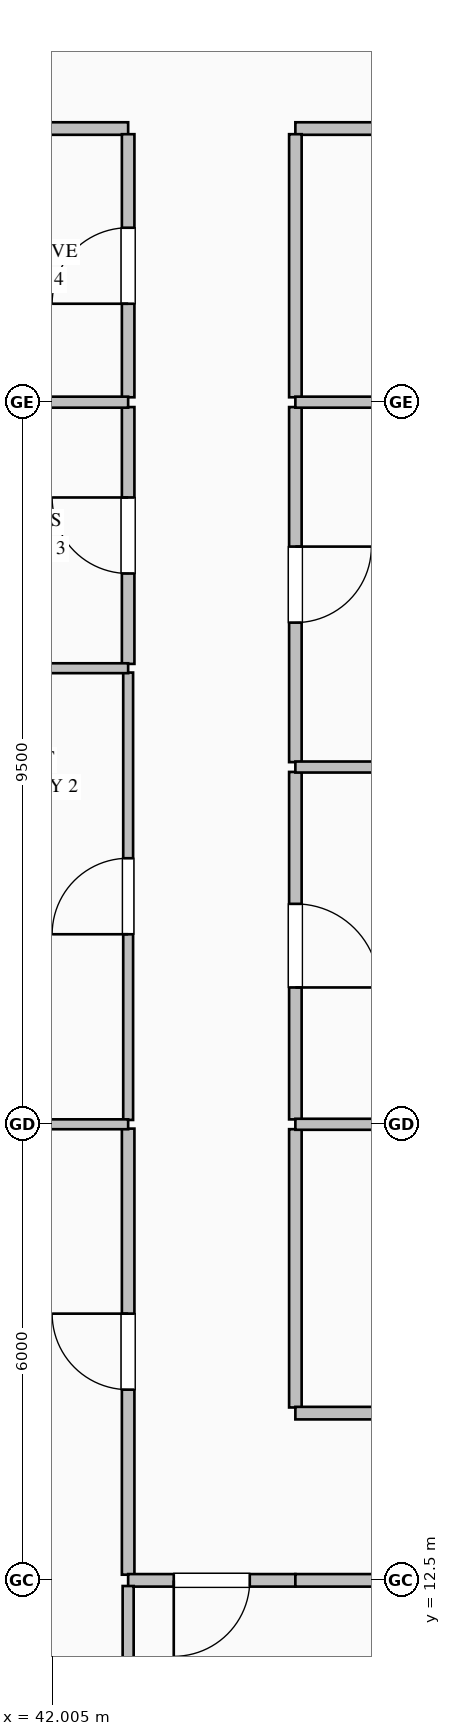
"""IFC4 building model, lengths in metres.
Left out: names, types, materials, properties, quantities, classifications, styles, units other than length and angle.
Written with IfcOpenShell. Run it as: python <this file> out.ifc"""

import sys

from ifc_helpers import new_model, si_unit, direction, frame, frame_2d, origin, place, context, subcontext, project, spatial, rectangle, extrude, element, fill, save


model = new_model("IFC4")
c1 = context("Model", 3, precision=1e-05, world=origin(), true_north=direction((0.0, 1.0)))
c2 = subcontext(c1, "Body", "Model", "MODEL_VIEW")
j1 = project(units=[si_unit("LENGTHUNIT", "METRE"), si_unit("PLANEANGLEUNIT", "RADIAN")], contexts=[c1])
p1 = place(None, origin())
s1 = spatial("IfcSite", under=j1, at=p1, CompositionType="ELEMENT")
p2 = place(p1, origin())
s2 = spatial("IfcBuilding", under=s1, at=p2, CompositionType="ELEMENT")
p3 = place(p2, frame((0.0, 0.0, 36.2)))
s3 = spatial("IfcBuildingStorey", under=s2, at=p3, CompositionType="ELEMENT", Elevation=36.2)
p4 = place(p3, frame((56.5, 31.6, 0.0), z_axis=(0.0, 0.0, 1.0), x_axis=(-1.0, 0.0, 0.0)))
e1 = element("IfcWall", 1, at=p4, inside=s3, PredefinedType="PARTITIONING", context=c2, shape_type="SweptSolid", body=[
    extrude(rectangle(XDim=11.3, YDim=0.165, at=frame_2d((5.65, 0.0))), origin(), (0.0, 0.0, 1.0), 3.75),
])
p5 = place(p4, frame((5.15, 0.0, 0.0)))
e2 = element("IfcOpeningElement", 2, at=p5, cuts=e1, PredefinedType="OPENING", context=c2, shape_type="SweptSolid", body=[
    extrude(rectangle(XDim=1.0, YDim=2.15, at=frame_2d((0.5, 1.075))), frame((0.0, 0.093, 0.0), z_axis=(0.0, -1.0, 0.0), x_axis=(1.0, 0.0, 0.0)), (0.0, 0.0, 1.0), 0.185),
])
p6 = place(p3, frame((43.0, 31.6, 0.0), z_axis=(0.0, 0.0, 1.0), x_axis=(-1.0, 0.0, 0.0)))
e3 = element("IfcWall", 3, at=p6, inside=s3, PredefinedType="PARTITIONING", context=c2, shape_type="SweptSolid", body=[
    extrude(rectangle(XDim=2.5, YDim=0.165, at=frame_2d((1.25, 0.0))), origin(), (0.0, 0.0, 1.0), 3.75),
])
p7 = place(p3, frame((45.2, 18.436, 0.0), z_axis=(0.0, 0.0, 1.0), x_axis=(0.0, -1.0, 0.0)))
e4 = element("IfcWall", 4, at=p7, inside=s3, PredefinedType="PARTITIONING", context=c2, shape_type="SweptSolid", body=[
    extrude(rectangle(XDim=3.661, YDim=0.165, at=frame_2d((1.831, 0.0))), origin(), (0.0, 0.0, 1.0), 3.75),
])
p8 = place(p3, frame((45.2, 23.135, 0.0), z_axis=(0.0, 0.0, 1.0), x_axis=(0.0, -1.0, 0.0)))
e5 = element("IfcWall", 5, at=p8, inside=s3, PredefinedType="PARTITIONING", context=c2, shape_type="SweptSolid", body=[
    extrude(rectangle(XDim=4.571, YDim=0.165, at=frame_2d((2.286, 0.0))), origin(), (0.0, 0.0, 1.0), 3.75),
])
p9 = place(p8, frame((1.736, 0.0, 0.0)))
e6 = element("IfcOpeningElement", 6, at=p9, cuts=e5, PredefinedType="OPENING", context=c2, shape_type="SweptSolid", body=[
    extrude(rectangle(XDim=1.1, YDim=2.2, at=frame_2d((0.55, 1.1))), frame((0.0, 0.093, 0.0), z_axis=(0.0, -1.0, 0.0), x_axis=(1.0, 0.0, 0.0)), (0.0, 0.0, 1.0), 0.185),
])
p10 = place(p3, frame((45.2, 27.936, 0.0), z_axis=(0.0, 0.0, 1.0), x_axis=(0.0, -1.0, 0.0)))
e7 = element("IfcWall", 7, at=p10, inside=s3, PredefinedType="PARTITIONING", context=c2, shape_type="SweptSolid", body=[
    extrude(rectangle(XDim=4.671, YDim=0.165, at=frame_2d((2.335, 0.0))), origin(), (0.0, 0.0, 1.0), 3.75),
])
p11 = place(p10, frame((1.835, 0.0, 0.0)))
e8 = element("IfcOpeningElement", 8, at=p11, cuts=e7, PredefinedType="OPENING", context=c2, shape_type="SweptSolid", body=[
    extrude(rectangle(XDim=1.0, YDim=2.15, at=frame_2d((0.5, 1.075))), frame((0.0, 0.093, 0.0), z_axis=(0.0, -1.0, 0.0), x_axis=(1.0, 0.0, 0.0)), (0.0, 0.0, 1.0), 0.185),
])
p12 = place(p3, frame((45.2, 31.525, 0.0), z_axis=(0.0, 0.0, 1.0), x_axis=(0.0, -1.0, 0.0)))
e9 = element("IfcWall", 9, at=p12, inside=s3, PredefinedType="PARTITIONING", context=c2, shape_type="SweptSolid", body=[
    extrude(rectangle(XDim=3.461, YDim=0.165, at=frame_2d((1.73, 0.0))), origin(), (0.0, 0.0, 1.0), 3.75),
])
p13 = place(p3, frame((43.0, 12.574, 0.0), z_axis=(0.0, 0.0, 1.0), x_axis=(0.0, 1.0, 0.0)))
e10 = element("IfcWall", 10, at=p13, inside=s3, PredefinedType="PARTITIONING", context=c2, shape_type="SweptSolid", body=[
    extrude(rectangle(XDim=5.869, YDim=0.165, at=frame_2d((2.934, 0.0))), origin(), (0.0, 0.0, 1.0), 3.75),
])
p14 = place(p13, frame((2.434, 0.0, 0.0)))
e11 = element("IfcOpeningElement", 11, at=p14, cuts=e10, PredefinedType="OPENING", context=c2, shape_type="SweptSolid", body=[
    extrude(rectangle(XDim=1.0, YDim=2.15, at=frame_2d((0.5, 1.075))), frame((0.0, 0.093, 0.0), z_axis=(0.0, -1.0, 0.0), x_axis=(1.0, 0.0, 0.0)), (0.0, 0.0, 1.0), 0.185),
])
p15 = place(p3, frame((43.0, 18.557, 0.0), z_axis=(0.0, 0.0, 1.0), x_axis=(0.0, 1.0, 0.0)))
e12 = element("IfcWall", 12, at=p15, inside=s3, PredefinedType="PARTITIONING", context=c2, shape_type="SweptSolid", body=[
    extrude(rectangle(XDim=5.886, YDim=0.13, at=frame_2d((2.943, 0.0))), origin(), (0.0, 0.0, 1.0), 3.75),
])
p16 = place(p15, frame((2.443, 0.0, 0.0)))
e13 = element("IfcOpeningElement", 13, at=p16, cuts=e12, PredefinedType="OPENING", context=c2, shape_type="SweptSolid", body=[
    extrude(rectangle(XDim=1.0, YDim=2.15, at=frame_2d((0.5, 1.075))), frame((0.0, 0.075, 0.0), z_axis=(0.0, -1.0, 0.0), x_axis=(1.0, 0.0, 0.0)), (0.0, 0.0, 1.0), 0.15),
])
p17 = place(p3, frame((43.0, 24.557, 0.0), z_axis=(0.0, 0.0, 1.0), x_axis=(0.0, 1.0, 0.0)))
e14 = element("IfcWall", 14, at=p17, inside=s3, PredefinedType="PARTITIONING", context=c2, shape_type="SweptSolid", body=[
    extrude(rectangle(XDim=3.379, YDim=0.165, at=frame_2d((1.689, 0.0))), origin(), (0.0, 0.0, 1.0), 3.75),
])
p18 = place(p17, frame((1.189, 0.0, 0.0)))
e15 = element("IfcOpeningElement", 15, at=p18, cuts=e14, PredefinedType="OPENING", context=c2, shape_type="SweptSolid", body=[
    extrude(rectangle(XDim=1.0, YDim=2.15, at=frame_2d((0.5, 1.075))), frame((0.0, 0.093, 0.0), z_axis=(0.0, -1.0, 0.0), x_axis=(1.0, 0.0, 0.0)), (0.0, 0.0, 1.0), 0.185),
])
p19 = place(p3, frame((43.0, 28.064, 0.0), z_axis=(0.0, 0.0, 1.0), x_axis=(0.0, 1.0, 0.0)))
e16 = element("IfcWall", 16, at=p19, inside=s3, PredefinedType="PARTITIONING", context=c2, shape_type="SweptSolid", body=[
    extrude(rectangle(XDim=3.461, YDim=0.165, at=frame_2d((1.73, 0.0))), origin(), (0.0, 0.0, 1.0), 3.75),
])
p20 = place(p19, frame((1.23, 0.0, 0.0)))
e17 = element("IfcOpeningElement", 17, at=p20, cuts=e16, PredefinedType="OPENING", context=c2, shape_type="SweptSolid", body=[
    extrude(rectangle(XDim=1.0, YDim=2.15, at=frame_2d((0.5, 1.075))), frame((0.0, 0.093, 0.0), z_axis=(0.0, -1.0, 0.0), x_axis=(1.0, 0.0, 0.0)), (0.0, 0.0, 1.0), 0.185),
])
p21 = place(p3, frame((45.2, 12.5, 0.0), z_axis=(0.0, 0.0, 1.0), x_axis=(-1.0, 0.0, 0.0)))
e18 = element("IfcWall", 18, at=p21, inside=s3, PredefinedType="PARTITIONING", context=c2, shape_type="SweptSolid", body=[
    extrude(rectangle(XDim=2.2, YDim=0.165, at=frame_2d((1.1, 0.0))), origin(), (0.0, 0.0, 1.0), 3.042),
])
p22 = place(p21, frame((0.6, 0.0, 0.0)))
e19 = element("IfcOpeningElement", 19, at=p22, cuts=e18, PredefinedType="OPENING", context=c2, shape_type="SweptSolid", body=[
    extrude(rectangle(XDim=1.0, YDim=2.15, at=frame_2d((0.5, 1.075))), frame((0.0, 0.093, 0.0), z_axis=(0.0, -1.0, 0.0), x_axis=(1.0, 0.0, 0.0)), (0.0, 0.0, 1.0), 0.185),
])
p23 = place(p3, frame((45.2, 14.7, 0.0), z_axis=(0.0, 0.0, 1.0), x_axis=(1.0, 0.0, 0.0)))
e20 = element("IfcWall", 20, at=p23, inside=s3, PredefinedType="PARTITIONING", context=c2, shape_type="SweptSolid", body=[
    extrude(rectangle(XDim=16.3, YDim=0.165, at=frame_2d((8.15, 0.0))), origin(), (0.0, 0.0, 1.0), 3.75),
])
p24 = place(p23, frame((7.65, 0.0, 0.0)))
e21 = element("IfcOpeningElement", 21, at=p24, cuts=e20, PredefinedType="OPENING", context=c2, shape_type="SweptSolid", body=[
    extrude(rectangle(XDim=1.0, YDim=2.15, at=frame_2d((0.5, 1.075))), frame((0.0, 0.093, 0.0), z_axis=(0.0, -1.0, 0.0), x_axis=(1.0, 0.0, 0.0)), (0.0, 0.0, 1.0), 0.185),
])
p25 = place(p3, frame((46.5, 12.5, 0.0), z_axis=(0.0, 0.0, 1.0), x_axis=(-1.0, 0.0, 0.0)))
e22 = element("IfcWall", 22, at=p25, inside=s3, PredefinedType="PARTITIONING", context=c2, shape_type="SweptSolid", body=[
    extrude(rectangle(XDim=1.3, YDim=0.165, at=frame_2d((0.65, 0.0))), origin(), (0.0, 0.0, 1.0), 3.042),
])
p26 = place(p3, frame((45.2, 18.5, 0.0), z_axis=(0.0, 0.0, 1.0), x_axis=(1.0, 0.0, 0.0)))
e23 = element("IfcWall", 23, at=p26, inside=s3, PredefinedType="PARTITIONING", context=c2, shape_type="SweptSolid", body=[
    extrude(rectangle(XDim=18.448, YDim=0.145, at=frame_2d((9.224, 0.0))), origin(), (0.0, 0.0, 1.0), 3.042),
])
p27 = place(p3, frame((45.2, 23.2, 0.0), z_axis=(0.0, 0.0, 1.0), x_axis=(1.0, 0.0, 0.0)))
e24 = element("IfcWall", 24, at=p27, inside=s3, PredefinedType="PARTITIONING", context=c2, shape_type="SweptSolid", body=[
    extrude(rectangle(XDim=18.448, YDim=0.145, at=frame_2d((9.224, 0.0))), origin(), (0.0, 0.0, 1.0), 3.342),
])
p28 = place(p3, frame((45.2, 28.0, 0.0), z_axis=(0.0, 0.0, 1.0), x_axis=(1.0, 0.0, 0.0)))
e25 = element("IfcWall", 25, at=p28, inside=s3, PredefinedType="PARTITIONING", context=c2, shape_type="SweptSolid", body=[
    extrude(rectangle(XDim=18.448, YDim=0.145, at=frame_2d((9.224, 0.0))), origin(), (0.0, 0.0, 1.0), 3.042),
])
p29 = place(p3, frame((40.852, 18.5, 0.0), z_axis=(0.0, 0.0, 1.0), x_axis=(1.0, 0.0, 0.0)))
e26 = element("IfcWall", 26, at=p29, inside=s3, PredefinedType="PARTITIONING", context=c2, shape_type="SweptSolid", body=[
    extrude(rectangle(XDim=2.148, YDim=0.13, at=frame_2d((1.074, 0.0))), origin(), (0.0, 0.0, 1.0), 3.042),
])
p30 = place(p3, frame((43.0, 12.426, 0.0), z_axis=(0.0, 0.0, 1.0), x_axis=(0.0, -1.0, 0.0)))
e27 = element("IfcWall", 27, at=p30, inside=s3, PredefinedType="PARTITIONING", context=c2, shape_type="SweptSolid", body=[
    extrude(rectangle(XDim=6.428, YDim=0.145, at=frame_2d((3.214, 0.0))), origin(), (0.0, 0.0, 1.0), 3.75),
])
p31 = place(p3, frame((40.852, 24.5, 0.0), z_axis=(0.0, 0.0, 1.0), x_axis=(1.0, 0.0, 0.0)))
e28 = element("IfcWall", 28, at=p31, inside=s3, PredefinedType="PARTITIONING", context=c2, shape_type="SweptSolid", body=[
    extrude(rectangle(XDim=2.148, YDim=0.13, at=frame_2d((1.074, 0.0))), origin(), (0.0, 0.0, 1.0), 3.75),
])
p32 = place(p3, frame((40.852, 28.0, 0.0), z_axis=(0.0, 0.0, 1.0), x_axis=(1.0, 0.0, 0.0)))
e29 = element("IfcWall", 29, at=p32, inside=s3, PredefinedType="PARTITIONING", context=c2, shape_type="SweptSolid", body=[
    extrude(rectangle(XDim=2.148, YDim=0.145, at=frame_2d((1.074, 0.0))), origin(), (0.0, 0.0, 1.0), 3.042),
])
p33 = place(p9, origin())
e30 = element("IfcDoor", 30, at=p33, inside=s3, OperationType="SINGLE_SWING_RIGHT", PredefinedType="DOOR", context=c2, shape_type="SweptSolid", body=[
    extrude(rectangle(XDim=1.1, YDim=2.2, at=frame_2d((0.55, 1.1))), frame((0.0, 0.025, 0.0), z_axis=(0.0, -1.0, 0.0), x_axis=(1.0, 0.0, 0.0)), (0.0, 0.0, 1.0), 0.05),
])
fill(e6, e30)
p34 = place(p11, origin())
e31 = element("IfcDoor", 31, at=p34, inside=s3, OperationType="SINGLE_SWING_LEFT", PredefinedType="DOOR", context=c2, shape_type="SweptSolid", body=[
    extrude(rectangle(XDim=1.0, YDim=2.15, at=frame_2d((0.5, 1.075))), frame((0.0, 0.025, 0.0), z_axis=(0.0, -1.0, 0.0), x_axis=(1.0, 0.0, 0.0)), (0.0, 0.0, 1.0), 0.05),
])
fill(e8, e31)
p35 = place(p14, origin())
e32 = element("IfcDoor", 32, at=p35, inside=s3, OperationType="SINGLE_SWING_RIGHT", PredefinedType="DOOR", context=c2, shape_type="SweptSolid", body=[
    extrude(rectangle(XDim=1.0, YDim=2.15, at=frame_2d((0.5, 1.075))), frame((0.0, 0.025, 0.0), z_axis=(0.0, -1.0, 0.0), x_axis=(1.0, 0.0, 0.0)), (0.0, 0.0, 1.0), 0.05),
])
fill(e11, e32)
p36 = place(p16, origin())
e33 = element("IfcDoor", 33, at=p36, inside=s3, OperationType="SINGLE_SWING_LEFT", PredefinedType="DOOR", context=c2, shape_type="SweptSolid", body=[
    extrude(rectangle(XDim=1.0, YDim=2.15, at=frame_2d((0.5, 1.075))), frame((0.0, 0.025, 0.0), z_axis=(0.0, -1.0, 0.0), x_axis=(1.0, 0.0, 0.0)), (0.0, 0.0, 1.0), 0.05),
])
fill(e13, e33)
p37 = place(p18, origin())
e34 = element("IfcDoor", 34, at=p37, inside=s3, OperationType="SINGLE_SWING_RIGHT", PredefinedType="DOOR", context=c2, shape_type="SweptSolid", body=[
    extrude(rectangle(XDim=1.0, YDim=2.15, at=frame_2d((0.5, 1.075))), frame((0.0, 0.025, 0.0), z_axis=(0.0, -1.0, 0.0), x_axis=(1.0, 0.0, 0.0)), (0.0, 0.0, 1.0), 0.05),
])
fill(e15, e34)
p38 = place(p20, origin())
e35 = element("IfcDoor", 35, at=p38, inside=s3, OperationType="SINGLE_SWING_LEFT", PredefinedType="DOOR", context=c2, shape_type="SweptSolid", body=[
    extrude(rectangle(XDim=1.0, YDim=2.15, at=frame_2d((0.5, 1.075))), frame((0.0, 0.025, 0.0), z_axis=(0.0, -1.0, 0.0), x_axis=(1.0, 0.0, 0.0)), (0.0, 0.0, 1.0), 0.05),
])
fill(e17, e35)
p39 = place(p22, origin())
e36 = element("IfcDoor", 36, at=p39, inside=s3, OperationType="SINGLE_SWING_RIGHT", PredefinedType="DOOR", context=c2, shape_type="SweptSolid", body=[
    extrude(rectangle(XDim=1.0, YDim=2.15, at=frame_2d((0.5, 1.075))), frame((0.0, 0.025, 0.0), z_axis=(0.0, -1.0, 0.0), x_axis=(1.0, 0.0, 0.0)), (0.0, 0.0, 1.0), 0.05),
])
fill(e19, e36)
save(model, sys.argv[1])
